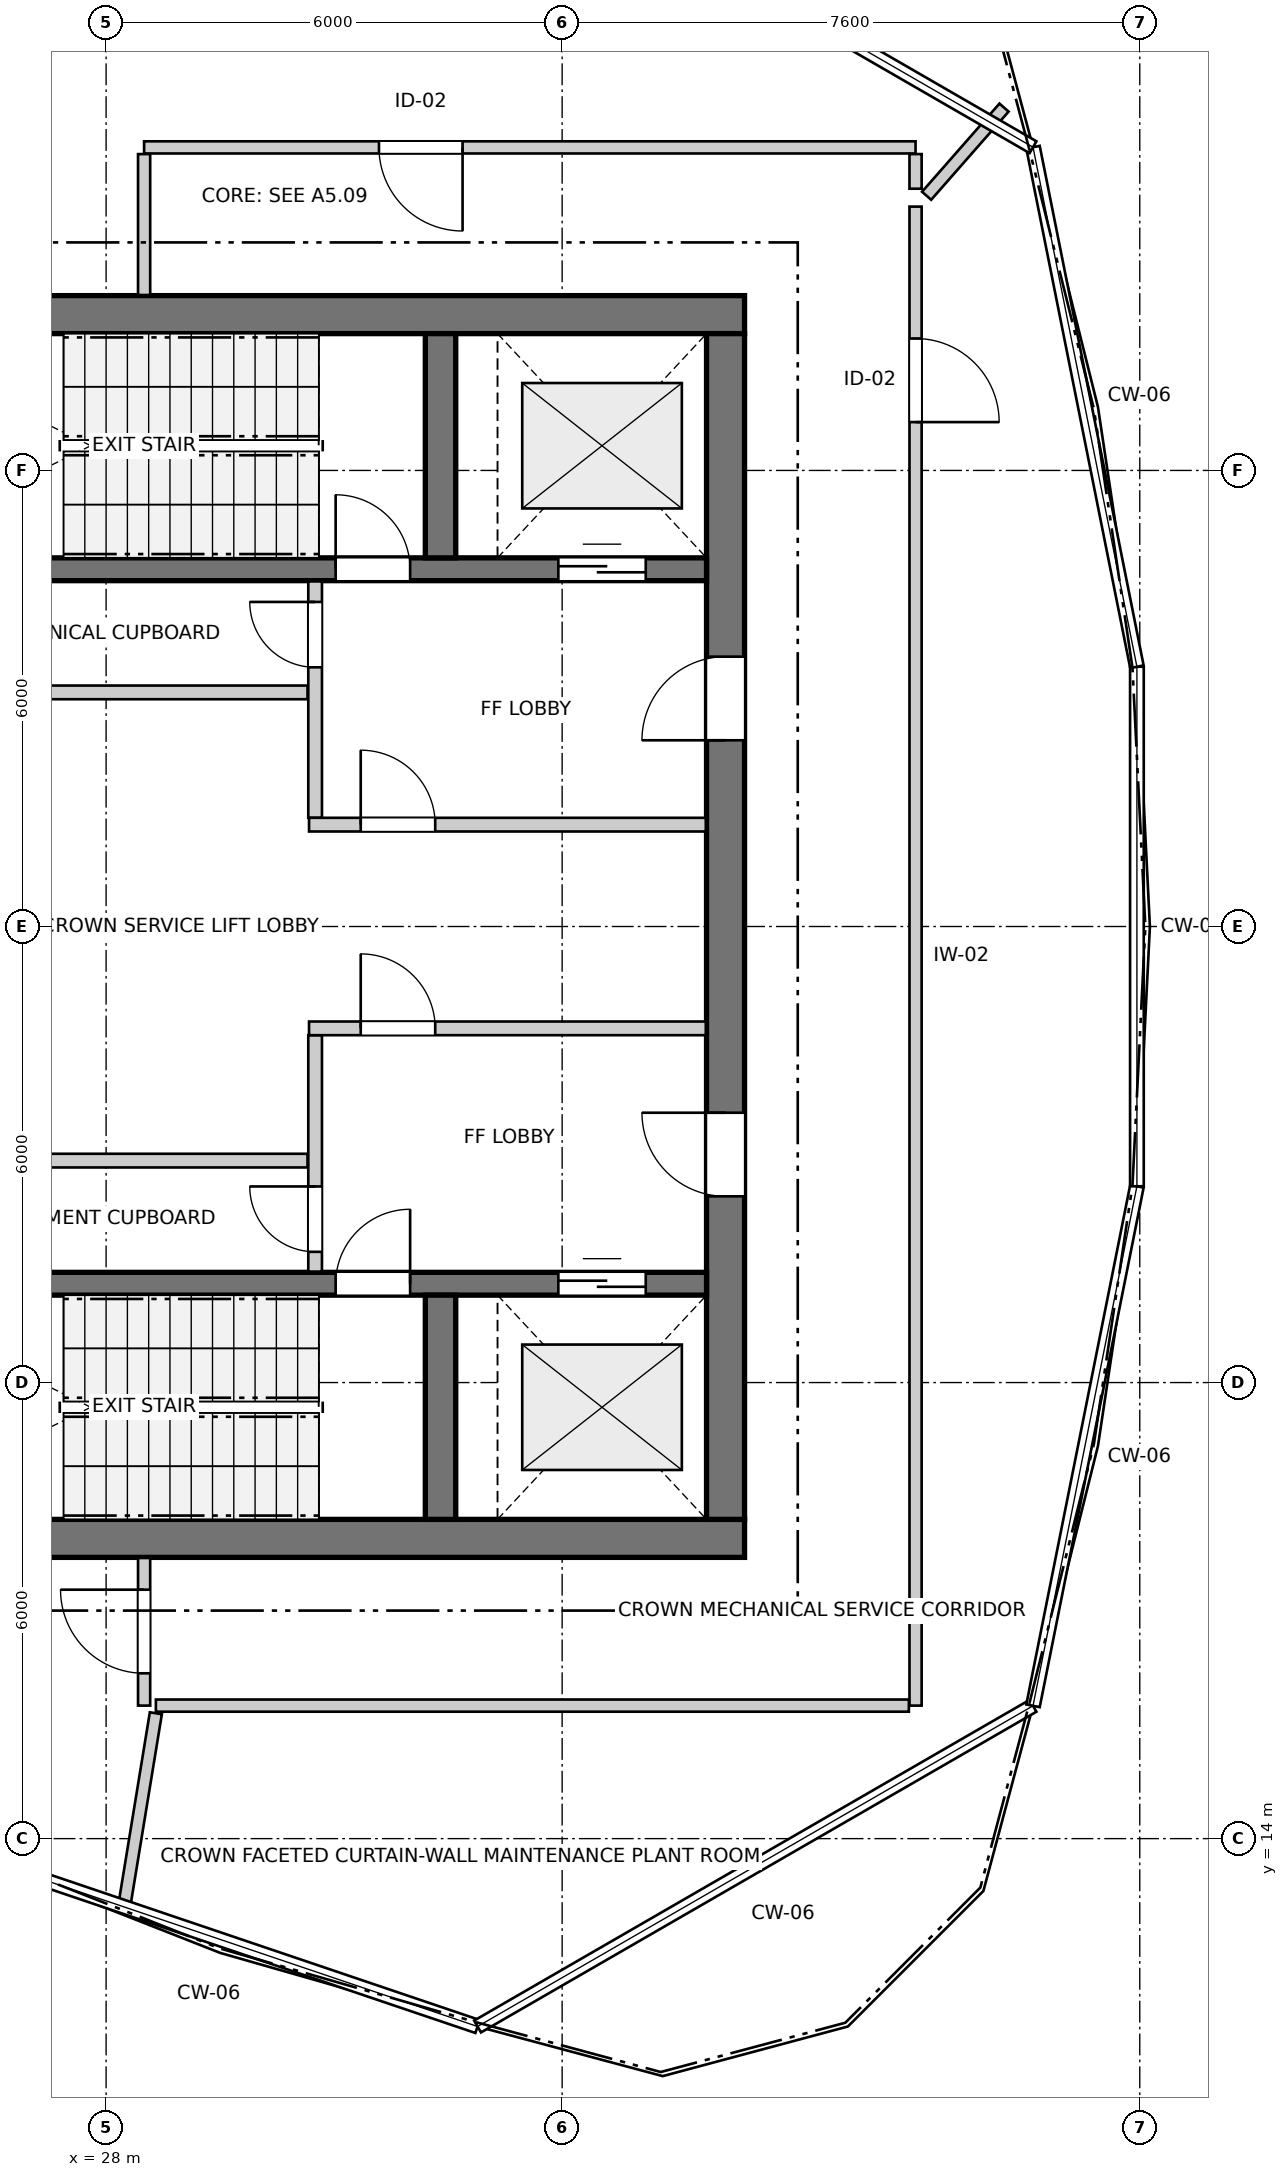
"""IFC4 building model, lengths in metres.
Left out: names, types, materials, properties, quantities, classifications, styles, units other than length and angle.
Written with IfcOpenShell. Run it as: python <this file> out.ifc"""

import sys

from ifc_helpers import new_model, si_unit, direction, frame, frame_2d, origin, place, context, subcontext, project, spatial, rectangle, extrude, source, transform, mapped, element, fill, save


model = new_model("IFC4")
c1 = context("Model", 3, precision=1e-05, world=origin(), true_north=direction((0.0, 1.0)))
c2 = subcontext(c1, "Body", "Model", "MODEL_VIEW")
j1 = project(units=[si_unit("LENGTHUNIT", "METRE"), si_unit("PLANEANGLEUNIT", "RADIAN")], contexts=[c1])
p1 = place(None, origin())
s1 = spatial("IfcSite", under=j1, at=p1, CompositionType="ELEMENT")
p2 = place(p1, origin())
s2 = spatial("IfcBuilding", under=s1, at=p2, CompositionType="ELEMENT")
p3 = place(p2, frame((0.0, 0.0, 261.8)))
s3 = spatial("IfcBuildingStorey", under=s2, at=p3, CompositionType="ELEMENT", Elevation=261.8)
for number, where, z_axis, x_axis in (
    (1, (24.3, 17.95, 0.0), (0.0, 0.0, 1.0), (1.0, 0.0, 0.0)),
    (2, (36.4, 34.05, 0.0), (0.0, 0.0, 1.0), (-1.0, 0.0, 0.0)),
):
    element("IfcWall", number, at=place(p3, frame(where, z_axis=z_axis, x_axis=x_axis)), inside=s3, PredefinedType="SHEAR", context=c2, shape_type="SweptSolid", body=[
        extrude(rectangle(XDim=12.1, YDim=0.5, at=frame_2d((6.05, 0.0))), origin(), (0.0, 0.0, 1.0), 4.05),
    ])
p4 = place(p3, frame((36.15, 18.2, 0.0), z_axis=(0.0, 0.0, 1.0), x_axis=(0.0, 1.0, 0.0)))
e3 = element("IfcWall", 3, at=p4, inside=s3, PredefinedType="SHEAR", context=c2, shape_type="SweptSolid", body=[
    extrude(rectangle(XDim=15.6, YDim=0.5, at=frame_2d((7.8, 0.0))), origin(), (0.0, 0.0, 1.0), 4.05),
])
p5 = place(p4, frame((4.25, 0.0, 0.0)))
e4 = element("IfcOpeningElement", 4, at=p5, cuts=e3, PredefinedType="OPENING", context=c2, shape_type="SweptSolid", body=[
    extrude(rectangle(XDim=1.1, YDim=2.15, at=frame_2d((0.55, 1.075))), frame((0.0, 0.26, 0.0), z_axis=(0.0, -1.0, 0.0), x_axis=(1.0, 0.0, 0.0)), (0.0, 0.0, 1.0), 0.52),
])
p6 = place(p4, frame((10.25, 0.0, 0.0)))
e5 = element("IfcOpeningElement", 5, at=p6, cuts=e3, PredefinedType="OPENING", context=c2, shape_type="SweptSolid", body=[
    extrude(rectangle(XDim=1.1, YDim=2.15, at=frame_2d((0.55, 1.075))), frame((0.0, 0.26, 0.0), z_axis=(0.0, -1.0, 0.0), x_axis=(1.0, 0.0, 0.0)), (0.0, 0.0, 1.0), 0.52),
])
p7 = place(p3, frame((24.8, 21.3, 0.0), z_axis=(0.0, 0.0, 1.0), x_axis=(1.0, 0.0, 0.0)))
e6 = element("IfcWall", 6, at=p7, inside=s3, PredefinedType="SHEAR", context=c2, shape_type="SweptSolid", body=[
    extrude(rectangle(XDim=11.1, YDim=0.3, at=frame_2d((5.55, 0.0))), origin(), (0.0, 0.0, 1.0), 4.05),
])
p8 = place(p7, frame((6.22, 0.0, 0.0)))
e7 = element("IfcOpeningElement", 7, at=p8, cuts=e6, PredefinedType="OPENING", context=c2, shape_type="SweptSolid", body=[
    extrude(rectangle(XDim=0.98, YDim=2.15, at=frame_2d((0.49, 1.075))), frame((0.0, 0.16, 0.0), z_axis=(0.0, -1.0, 0.0), x_axis=(1.0, 0.0, 0.0)), (0.0, 0.0, 1.0), 0.32),
])
p9 = place(p7, frame((9.15, 0.0, 0.0)))
e8 = element("IfcOpeningElement", 8, at=p9, cuts=e6, PredefinedType="OPENING", context=c2, shape_type="SweptSolid", body=[
    extrude(rectangle(XDim=1.15, YDim=2.15, at=frame_2d((0.575, 1.075))), frame((0.0, 0.16, 0.0), z_axis=(0.0, -1.0, 0.0), x_axis=(1.0, 0.0, 0.0)), (0.0, 0.0, 1.0), 0.32),
])
p10 = place(p3, frame((32.4, 18.2, 0.0), z_axis=(0.0, 0.0, 1.0), x_axis=(0.0, 1.0, 0.0)))
e9 = element("IfcWall", 9, at=p10, inside=s3, PredefinedType="SHEAR", context=c2, shape_type="SweptSolid", body=[
    extrude(rectangle(XDim=2.95, YDim=0.4, at=frame_2d((1.475, 0.0))), origin(), (0.0, 0.0, 1.0), 4.05),
])
p11 = place(p3, frame((24.8, 30.7, 0.0), z_axis=(0.0, 0.0, 1.0), x_axis=(1.0, 0.0, 0.0)))
e10 = element("IfcWall", 10, at=p11, inside=s3, PredefinedType="SHEAR", context=c2, shape_type="SweptSolid", body=[
    extrude(rectangle(XDim=11.1, YDim=0.3, at=frame_2d((5.55, 0.0))), origin(), (0.0, 0.0, 1.0), 4.05),
])
p12 = place(p11, frame((6.22, 0.0, 0.0)))
e11 = element("IfcOpeningElement", 11, at=p12, cuts=e10, PredefinedType="OPENING", context=c2, shape_type="SweptSolid", body=[
    extrude(rectangle(XDim=0.98, YDim=2.15, at=frame_2d((0.49, 1.075))), frame((0.0, 0.16, 0.0), z_axis=(0.0, -1.0, 0.0), x_axis=(1.0, 0.0, 0.0)), (0.0, 0.0, 1.0), 0.32),
])
p13 = place(p11, frame((9.15, 0.0, 0.0)))
e12 = element("IfcOpeningElement", 12, at=p13, cuts=e10, PredefinedType="OPENING", context=c2, shape_type="SweptSolid", body=[
    extrude(rectangle(XDim=1.15, YDim=2.15, at=frame_2d((0.575, 1.075))), frame((0.0, 0.16, 0.0), z_axis=(0.0, -1.0, 0.0), x_axis=(1.0, 0.0, 0.0)), (0.0, 0.0, 1.0), 0.32),
])
p14 = place(p3, frame((32.4, 30.85, 0.0), z_axis=(0.0, 0.0, 1.0), x_axis=(0.0, 1.0, 0.0)))
e13 = element("IfcWall", 13, at=p14, inside=s3, PredefinedType="SHEAR", context=c2, shape_type="SweptSolid", body=[
    extrude(rectangle(XDim=2.95, YDim=0.4, at=frame_2d((1.475, 0.0))), origin(), (0.0, 0.0, 1.0), 4.05),
])
p15 = place(p3, frame((30.75, 21.46, 0.0), z_axis=(0.0, 0.0, 1.0), x_axis=(0.0, 1.0, 0.0)))
e14 = element("IfcWall", 14, at=p15, inside=s3, PredefinedType="PARTITIONING", context=c2, shape_type="SweptSolid", body=[
    extrude(rectangle(XDim=3.11, YDim=0.18, at=frame_2d((1.555, 0.0))), origin(), (0.0, 0.0, 1.0), 4.05),
])
p16 = place(p15, frame((0.26, 0.0, 0.0)))
e15 = element("IfcOpeningElement", 15, at=p16, cuts=e14, PredefinedType="OPENING", context=c2, shape_type="SweptSolid", body=[
    extrude(rectangle(XDim=0.86, YDim=2.05, at=frame_2d((0.43, 1.025))), frame((0.0, 0.1, 0.0), z_axis=(0.0, -1.0, 0.0), x_axis=(1.0, 0.0, 0.0)), (0.0, 0.0, 1.0), 0.2),
])
p17 = place(p3, frame((30.67, 24.66, 0.0), z_axis=(0.0, 0.0, 1.0), x_axis=(1.0, 0.0, 0.0)))
e16 = element("IfcWall", 16, at=p17, inside=s3, PredefinedType="PARTITIONING", context=c2, shape_type="SweptSolid", body=[
    extrude(rectangle(XDim=5.22, YDim=0.18, at=frame_2d((2.61, 0.0))), origin(), (0.0, 0.0, 1.0), 4.05),
])
p18 = place(p17, frame((0.68, 0.0, 0.0)))
e17 = element("IfcOpeningElement", 17, at=p18, cuts=e16, PredefinedType="OPENING", context=c2, shape_type="SweptSolid", body=[
    extrude(rectangle(XDim=0.98, YDim=2.15, at=frame_2d((0.49, 1.075))), frame((0.0, 0.1, 0.0), z_axis=(0.0, -1.0, 0.0), x_axis=(1.0, 0.0, 0.0)), (0.0, 0.0, 1.0), 0.2),
])
p19 = place(p3, frame((30.75, 27.43, 0.0), z_axis=(0.0, 0.0, 1.0), x_axis=(0.0, 1.0, 0.0)))
e18 = element("IfcWall", 18, at=p19, inside=s3, PredefinedType="PARTITIONING", context=c2, shape_type="SweptSolid", body=[
    extrude(rectangle(XDim=3.11, YDim=0.18, at=frame_2d((1.555, 0.0))), origin(), (0.0, 0.0, 1.0), 4.05),
])
p20 = place(p19, frame((1.98, 0.0, 0.0)))
e19 = element("IfcOpeningElement", 19, at=p20, cuts=e18, PredefinedType="OPENING", context=c2, shape_type="SweptSolid", body=[
    extrude(rectangle(XDim=0.86, YDim=2.05, at=frame_2d((0.43, 1.025))), frame((0.0, 0.1, 0.0), z_axis=(0.0, -1.0, 0.0), x_axis=(1.0, 0.0, 0.0)), (0.0, 0.0, 1.0), 0.2),
])
p21 = place(p3, frame((30.67, 27.34, 0.0), z_axis=(0.0, 0.0, 1.0), x_axis=(1.0, 0.0, 0.0)))
e20 = element("IfcWall", 20, at=p21, inside=s3, PredefinedType="PARTITIONING", context=c2, shape_type="SweptSolid", body=[
    extrude(rectangle(XDim=5.22, YDim=0.18, at=frame_2d((2.61, 0.0))), origin(), (0.0, 0.0, 1.0), 4.05),
])
p22 = place(p21, frame((0.68, 0.0, 0.0)))
e21 = element("IfcOpeningElement", 21, at=p22, cuts=e20, PredefinedType="OPENING", context=c2, shape_type="SweptSolid", body=[
    extrude(rectangle(XDim=0.98, YDim=2.15, at=frame_2d((0.49, 1.075))), frame((0.0, 0.1, 0.0), z_axis=(0.0, -1.0, 0.0), x_axis=(1.0, 0.0, 0.0)), (0.0, 0.0, 1.0), 0.2),
])
for number, where, z_axis, x_axis in (
    (22, (24.81, 22.92, 0.0), (0.0, 0.0, 1.0), (1.0, 0.0, 0.0)),
    (23, (24.81, 29.08, 0.0), (0.0, 0.0, 1.0), (1.0, 0.0, 0.0)),
):
    element("IfcWall", number, at=place(p3, frame(where, z_axis=z_axis, x_axis=x_axis)), inside=s3, PredefinedType="PARTITIONING", context=c2, shape_type="SweptSolid", body=[
        extrude(rectangle(XDim=5.84, YDim=0.18, at=frame_2d((2.92, 0.0))), origin(), (0.0, 0.0, 1.0), 4.05),
    ])
p23 = place(p3, frame((38.65, 35.471, 0.0), z_axis=(0.0, 0.0, 1.0), x_axis=(0.0, -1.0, 0.0)))
e24 = element("IfcWall", 24, at=p23, inside=s3, PredefinedType="PARTITIONING", context=c2, shape_type="SweptSolid", body=[
    extrude(rectangle(XDim=19.721, YDim=0.16, at=frame_2d((9.86, 0.0))), origin(), (0.0, 0.0, 1.0), 4.05),
])
p24 = place(p23, frame((1.735, 0.0, 0.0)))
e25 = element("IfcOpeningElement", 25, at=p24, cuts=e24, PredefinedType="OPENING", context=c2, shape_type="SweptSolid", body=[
    extrude(rectangle(XDim=1.1, YDim=2.15, at=frame_2d((0.55, 1.075))), frame((0.0, 0.09, 0.0), z_axis=(0.0, -1.0, 0.0), x_axis=(1.0, 0.0, 0.0)), (0.0, 0.0, 1.0), 0.18),
])
p25 = place(p3, frame((38.65, 36.25, 0.0), z_axis=(0.0, 0.0, 1.0), x_axis=(-1.0, 0.0, 0.0)))
e26 = element("IfcWall", 26, at=p25, inside=s3, PredefinedType="PARTITIONING", context=c2, shape_type="SweptSolid", body=[
    extrude(rectangle(XDim=10.15, YDim=0.16, at=frame_2d((5.075, 0.0))), origin(), (0.0, 0.0, 1.0), 4.05),
])
p26 = place(p25, frame((5.96, 0.0, 0.0)))
e27 = element("IfcOpeningElement", 27, at=p26, cuts=e26, PredefinedType="OPENING", context=c2, shape_type="SweptSolid", body=[
    extrude(rectangle(XDim=1.1, YDim=2.15, at=frame_2d((0.55, 1.075))), frame((0.0, 0.09, 0.0), z_axis=(0.0, -1.0, 0.0), x_axis=(1.0, 0.0, 0.0)), (0.0, 0.0, 1.0), 0.18),
])
p27 = place(p3, frame((28.5, 15.75, 0.0), z_axis=(0.0, 0.0, 1.0), x_axis=(0.0, 1.0, 0.0)))
e28 = element("IfcWall", 28, at=p27, inside=s3, PredefinedType="PARTITIONING", context=c2, shape_type="SweptSolid", body=[
    extrude(rectangle(XDim=1.942, YDim=0.16, at=frame_2d((0.971, 0.0))), origin(), (0.0, 0.0, 1.0), 4.05),
])
p28 = place(p27, frame((0.425, 0.0, 0.0)))
e29 = element("IfcOpeningElement", 29, at=p28, cuts=e28, PredefinedType="OPENING", context=c2, shape_type="SweptSolid", body=[
    extrude(rectangle(XDim=1.1, YDim=2.15, at=frame_2d((0.55, 1.075))), frame((0.0, 0.09, 0.0), z_axis=(0.0, -1.0, 0.0), x_axis=(1.0, 0.0, 0.0)), (0.0, 0.0, 1.0), 0.18),
])
p29 = place(p3, frame((28.655, 15.75, 0.0), z_axis=(0.0, 0.0, 1.0), x_axis=(1.0, 0.0, 0.0)))
e30 = element("IfcWall", 30, at=p29, inside=s3, PredefinedType="PARTITIONING", context=c2, shape_type="SweptSolid", body=[
    extrude(rectangle(XDim=9.907, YDim=0.16, at=frame_2d((4.954, 0.0))), origin(), (0.0, 0.0, 1.0), 4.05),
])
p30 = place(p3, frame((28.241, 13.128, 0.0), z_axis=(0.0, 0.0, 1.0), x_axis=(0.161794860742, 0.986824413479, 0.0)))
e31 = element("IfcWall", 31, at=p30, inside=s3, PredefinedType="PARTITIONING", context=c2, shape_type="SweptSolid", body=[
    extrude(rectangle(XDim=2.555, YDim=0.16, at=frame_2d((1.277, 0.0))), origin(), (0.0, 0.0, 1.0), 4.05),
])
p31 = place(p3, frame((28.5, 34.308, 0.0), z_axis=(0.0, 0.0, 1.0), x_axis=(0.0, 1.0, 0.0)))
e32 = element("IfcWall", 32, at=p31, inside=s3, PredefinedType="PARTITIONING", context=c2, shape_type="SweptSolid", body=[
    extrude(rectangle(XDim=1.854, YDim=0.16, at=frame_2d((0.927, 0.0))), origin(), (0.0, 0.0, 1.0), 4.05),
])
p32 = place(p3, frame((38.795, 35.614, 0.0), z_axis=(0.0, 0.0, 1.0), x_axis=(0.65984690388, 0.751400068832, 0.0)))
e33 = element("IfcWall", 33, at=p32, inside=s3, PredefinedType="PARTITIONING", context=c2, shape_type="SweptSolid", body=[
    extrude(rectangle(XDim=1.544, YDim=0.16, at=frame_2d((0.772, 0.0))), origin(), (0.0, 0.0, 1.0), 4.05),
])
p33 = place(p3, frame((38.65, 35.706, 0.0), z_axis=(0.0, 0.0, 1.0), x_axis=(0.0, 1.0, 0.0)))
e34 = element("IfcWall", 34, at=p33, inside=s3, PredefinedType="PARTITIONING", context=c2, shape_type="SweptSolid", body=[
    extrude(rectangle(XDim=0.456, YDim=0.16, at=frame_2d((0.228, 0.0))), origin(), (0.0, 0.0, 1.0), 4.05),
])
m1 = source(origin(), c2, "Body", "SweptSolid", [
    extrude(rectangle(XDim=0.98, YDim=2.15, at=frame_2d((0.49, 1.075))), frame((0.0, 0.025, 0.0), z_axis=(0.0, -1.0, 0.0), x_axis=(1.0, 0.0, 0.0)), (0.0, 0.0, 1.0), 0.05),
])
p34 = place(p8, origin())
e35 = element("IfcDoor", 35, at=p34, inside=s3, OperationType="SINGLE_SWING_RIGHT", PredefinedType="DOOR", context=c2, shape_type="MappedRepresentation", body=[
    mapped(m1, transform((0.0, 0.0, 0.0), x_axis=(1.0, 0.0, 0.0), y_axis=(0.0, 1.0, 0.0), z_axis=(0.0, 0.0, 1.0), scale=1.0)),
])
fill(e7, e35)
m2 = source(origin(), c2, "Body", "SweptSolid", [
    extrude(rectangle(XDim=1.15, YDim=2.15, at=frame_2d((0.575, 1.075))), frame((0.0, 0.025, 0.0), z_axis=(0.0, -1.0, 0.0), x_axis=(1.0, 0.0, 0.0)), (0.0, 0.0, 1.0), 0.05),
])
p35 = place(p9, origin())
e36 = element("IfcDoor", 36, at=p35, inside=s3, OperationType="DOUBLE_DOOR_SLIDING", PredefinedType="DOOR", context=c2, shape_type="MappedRepresentation", body=[
    mapped(m2, transform((0.0, 0.0, 0.0), x_axis=(1.0, 0.0, 0.0), y_axis=(0.0, 1.0, 0.0), z_axis=(0.0, 0.0, 1.0), scale=1.0)),
])
fill(e8, e36)
p36 = place(p12, origin())
e37 = element("IfcDoor", 37, at=p36, inside=s3, OperationType="SINGLE_SWING_LEFT", PredefinedType="DOOR", context=c2, shape_type="MappedRepresentation", body=[
    mapped(m1, transform((0.0, 0.0, 0.0), x_axis=(1.0, 0.0, 0.0), y_axis=(0.0, 1.0, 0.0), z_axis=(0.0, 0.0, 1.0), scale=1.0)),
])
fill(e11, e37)
p37 = place(p13, origin())
e38 = element("IfcDoor", 38, at=p37, inside=s3, OperationType="DOUBLE_DOOR_SLIDING", PredefinedType="DOOR", context=c2, shape_type="MappedRepresentation", body=[
    mapped(m2, transform((0.0, 0.0, 0.0), x_axis=(1.0, 0.0, 0.0), y_axis=(0.0, 1.0, 0.0), z_axis=(0.0, 0.0, 1.0), scale=1.0)),
])
fill(e12, e38)
m3 = source(origin(), c2, "Body", "SweptSolid", [
    extrude(rectangle(XDim=1.1, YDim=2.15, at=frame_2d((0.55, 1.075))), frame((0.0, 0.025, 0.0), z_axis=(0.0, -1.0, 0.0), x_axis=(1.0, 0.0, 0.0)), (0.0, 0.0, 1.0), 0.05),
])
p38 = place(p5, origin())
e39 = element("IfcDoor", 39, at=p38, inside=s3, OperationType="SINGLE_SWING_RIGHT", PredefinedType="DOOR", context=c2, shape_type="MappedRepresentation", body=[
    mapped(m3, transform((0.0, 0.0, 0.0), x_axis=(1.0, 0.0, 0.0), y_axis=(0.0, 1.0, 0.0), z_axis=(0.0, 0.0, 1.0), scale=1.0)),
])
fill(e4, e39)
p39 = place(p6, origin())
e40 = element("IfcDoor", 40, at=p39, inside=s3, OperationType="SINGLE_SWING_LEFT", PredefinedType="DOOR", context=c2, shape_type="MappedRepresentation", body=[
    mapped(m3, transform((0.0, 0.0, 0.0), x_axis=(1.0, 0.0, 0.0), y_axis=(0.0, 1.0, 0.0), z_axis=(0.0, 0.0, 1.0), scale=1.0)),
])
fill(e5, e40)
m4 = source(origin(), c2, "Body", "SweptSolid", [
    extrude(rectangle(XDim=0.86, YDim=2.05, at=frame_2d((0.43, 1.025))), frame((0.0, 0.025, 0.0), z_axis=(0.0, -1.0, 0.0), x_axis=(1.0, 0.0, 0.0)), (0.0, 0.0, 1.0), 0.05),
])
p40 = place(p16, origin())
e41 = element("IfcDoor", 41, at=p40, inside=s3, OperationType="SINGLE_SWING_RIGHT", PredefinedType="DOOR", context=c2, shape_type="MappedRepresentation", body=[
    mapped(m4, transform((0.0, 0.0, 0.0), x_axis=(1.0, 0.0, 0.0), y_axis=(0.0, 1.0, 0.0), z_axis=(0.0, 0.0, 1.0), scale=1.0)),
])
fill(e15, e41)
p41 = place(p18, origin())
e42 = element("IfcDoor", 42, at=p41, inside=s3, OperationType="SINGLE_SWING_LEFT", PredefinedType="DOOR", context=c2, shape_type="MappedRepresentation", body=[
    mapped(m1, transform((0.0, 0.0, 0.0), x_axis=(1.0, 0.0, 0.0), y_axis=(0.0, 1.0, 0.0), z_axis=(0.0, 0.0, 1.0), scale=1.0)),
])
fill(e17, e42)
p42 = place(p20, origin())
e43 = element("IfcDoor", 43, at=p42, inside=s3, OperationType="SINGLE_SWING_RIGHT", PredefinedType="DOOR", context=c2, shape_type="MappedRepresentation", body=[
    mapped(m4, transform((0.0, 0.0, 0.0), x_axis=(1.0, 0.0, 0.0), y_axis=(0.0, 1.0, 0.0), z_axis=(0.0, 0.0, 1.0), scale=1.0)),
])
fill(e19, e43)
p43 = place(p22, origin())
e44 = element("IfcDoor", 44, at=p43, inside=s3, OperationType="SINGLE_SWING_LEFT", PredefinedType="DOOR", context=c2, shape_type="MappedRepresentation", body=[
    mapped(m1, transform((0.0, 0.0, 0.0), x_axis=(1.0, 0.0, 0.0), y_axis=(0.0, 1.0, 0.0), z_axis=(0.0, 0.0, 1.0), scale=1.0)),
])
fill(e21, e44)
p44 = place(p24, origin())
e45 = element("IfcDoor", 45, at=p44, inside=s3, OperationType="SINGLE_SWING_RIGHT", PredefinedType="DOOR", context=c2, shape_type="MappedRepresentation", body=[
    mapped(m3, transform((0.0, 0.0, 0.0), x_axis=(1.0, 0.0, 0.0), y_axis=(0.0, 1.0, 0.0), z_axis=(0.0, 0.0, 1.0), scale=1.0)),
])
fill(e25, e45)
p45 = place(p26, origin())
e46 = element("IfcDoor", 46, at=p45, inside=s3, OperationType="SINGLE_SWING_LEFT", PredefinedType="DOOR", context=c2, shape_type="MappedRepresentation", body=[
    mapped(m3, transform((0.0, 0.0, 0.0), x_axis=(1.0, 0.0, 0.0), y_axis=(0.0, 1.0, 0.0), z_axis=(0.0, 0.0, 1.0), scale=1.0)),
])
fill(e27, e46)
p46 = place(p28, origin())
e47 = element("IfcDoor", 47, at=p46, inside=s3, OperationType="SINGLE_SWING_RIGHT", PredefinedType="DOOR", context=c2, shape_type="MappedRepresentation", body=[
    mapped(m3, transform((0.0, 0.0, 0.0), x_axis=(1.0, 0.0, 0.0), y_axis=(0.0, 1.0, 0.0), z_axis=(0.0, 0.0, 1.0), scale=1.0)),
])
fill(e29, e47)
save(model, sys.argv[1])
